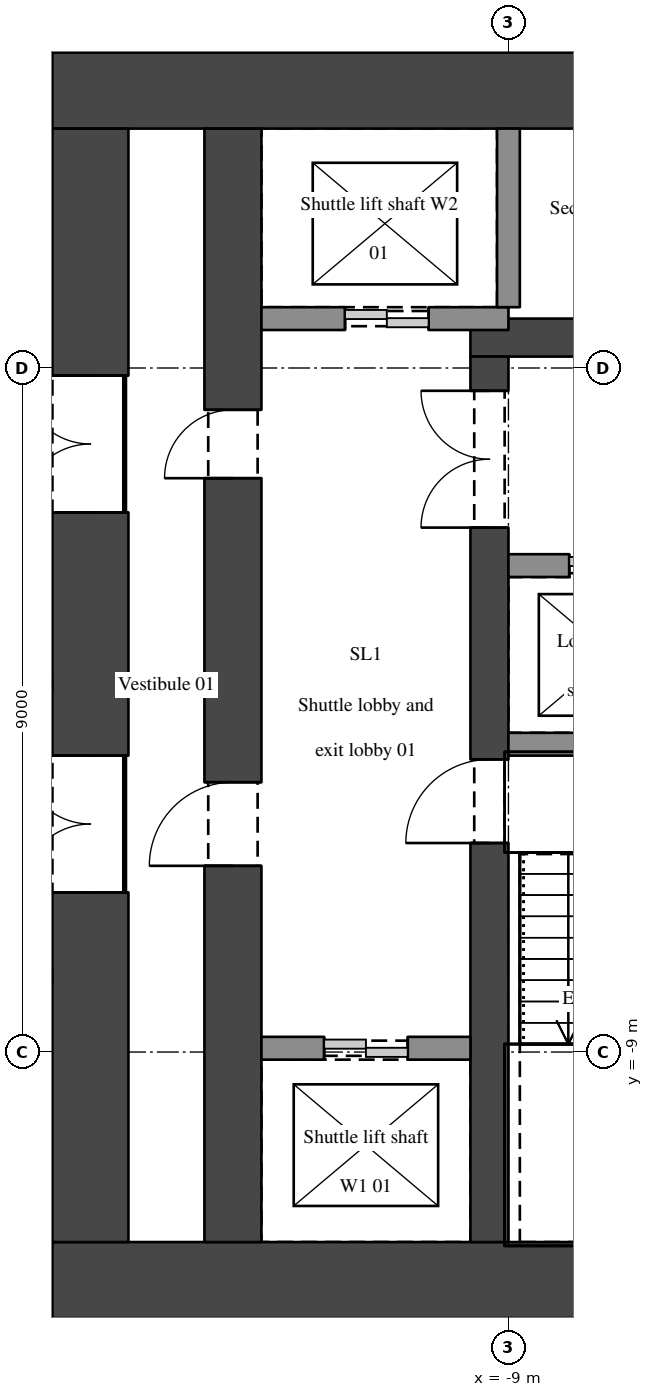
"""IFC4 building model, lengths in metres.
Left out: names, types, materials, properties, quantities, classifications, styles, units other than length and angle.
Written with IfcOpenShell. Run it as: python <this file> out.ifc"""

import sys

from ifc_helpers import new_model, si_unit, direction, frame, frame_2d, origin, place, context, subcontext, project, spatial, rectangle, extrude, element, fill, save


model = new_model("IFC4")
c1 = context("Model", 3, precision=1e-05, world=origin(), true_north=direction((0.0, 1.0)))
c2 = subcontext(c1, "Body", "Model", "MODEL_VIEW")
j1 = project(units=[si_unit("LENGTHUNIT", "METRE"), si_unit("PLANEANGLEUNIT", "RADIAN")], contexts=[c1])
p1 = place(None, origin())
s1 = spatial("IfcSite", under=j1, at=p1, CompositionType="ELEMENT")
p2 = place(p1, origin())
s2 = spatial("IfcBuilding", under=s1, at=p2, CompositionType="ELEMENT")
p3 = place(p2, origin())
s3 = spatial("IfcBuildingStorey", under=s2, at=p3, CompositionType="ELEMENT", Elevation=0.0)
for number, where, z_axis, x_axis in (
    (1, (-15.0, -12.0, 0.0), (0.0, 0.0, 1.0), (1.0, 0.0, 0.0)),
    (2, (-15.0, 3.65, 0.0), (0.0, 0.0, 1.0), (1.0, 0.0, 0.0)),
):
    element("IfcWall", number, at=place(p3, frame(where, z_axis=z_axis, x_axis=x_axis)), inside=s3, PredefinedType="SHEAR", context=c2, shape_type="SweptSolid", body=[
        extrude(rectangle(XDim=30.0, YDim=1.0, at=frame_2d((15.0, 0.0))), origin(), (0.0, 0.0, 1.0), 10.8),
    ])
p4 = place(p3, frame((-14.5, -11.5, 0.0), z_axis=(0.0, 0.0, 1.0), x_axis=(0.0, 1.0, 0.0)))
e3 = element("IfcWall", 3, at=p4, inside=s3, PredefinedType="SHEAR", context=c2, shape_type="SweptSolid", body=[
    extrude(rectangle(XDim=14.65, YDim=1.0, at=frame_2d((7.325, 0.0))), origin(), (0.0, 0.0, 1.0), 10.8),
])
p5 = place(p4, frame((9.6, 0.0, 0.0)))
e4 = element("IfcOpeningElement", 4, at=p5, cuts=e3, PredefinedType="OPENING", context=c2, shape_type="SweptSolid", body=[
    extrude(rectangle(XDim=1.8, YDim=2.1, at=frame_2d((0.9, 1.05))), frame((0.0, 0.51, 0.0), z_axis=(0.0, -1.0, 0.0), x_axis=(1.0, 0.0, 0.0)), (0.0, 0.0, 1.0), 1.02),
])
p6 = place(p4, frame((4.6, 0.0, 0.0)))
e5 = element("IfcOpeningElement", 5, at=p6, cuts=e3, PredefinedType="OPENING", context=c2, shape_type="SweptSolid", body=[
    extrude(rectangle(XDim=1.8, YDim=2.1, at=frame_2d((0.9, 1.05))), frame((0.0, 0.51, 0.0), z_axis=(0.0, -1.0, 0.0), x_axis=(1.0, 0.0, 0.0)), (0.0, 0.0, 1.0), 1.02),
])
p7 = place(p3, frame((-12.625, -11.5, 0.0), z_axis=(0.0, 0.0, 1.0), x_axis=(0.0, 1.0, 0.0)))
e6 = element("IfcWall", 6, at=p7, inside=s3, PredefinedType="SHEAR", context=c2, shape_type="SweptSolid", body=[
    extrude(rectangle(XDim=14.65, YDim=0.75, at=frame_2d((7.325, 0.0))), origin(), (0.0, 0.0, 1.0), 10.8),
])
p8 = place(p7, frame((4.95, 0.0, 0.0)))
e7 = element("IfcOpeningElement", 7, at=p8, cuts=e6, PredefinedType="OPENING", context=c2, shape_type="SweptSolid", body=[
    extrude(rectangle(XDim=1.1, YDim=2.1, at=frame_2d((0.55, 1.05))), frame((0.0, 0.385, 0.0), z_axis=(0.0, -1.0, 0.0), x_axis=(1.0, 0.0, 0.0)), (0.0, 0.0, 1.0), 0.77),
])
p9 = place(p7, frame((10.05, 0.0, 0.0)))
e8 = element("IfcOpeningElement", 8, at=p9, cuts=e6, PredefinedType="OPENING", context=c2, shape_type="SweptSolid", body=[
    extrude(rectangle(XDim=0.9, YDim=2.1, at=frame_2d((0.45, 1.05))), frame((0.0, 0.385, 0.0), z_axis=(0.0, -1.0, 0.0), x_axis=(1.0, 0.0, 0.0)), (0.0, 0.0, 1.0), 0.77),
])
p10 = place(p3, frame((-9.5, 0.4, 0.0), z_axis=(0.0, 0.0, 1.0), x_axis=(1.0, 0.0, 0.0)))
e9 = element("IfcWall", 9, at=p10, inside=s3, PredefinedType="SHEAR", context=c2, shape_type="SweptSolid", body=[
    extrude(rectangle(XDim=19.0, YDim=0.5, at=frame_2d((9.5, 0.0))), origin(), (0.0, 0.0, 1.0), 10.8),
])
p11 = place(p10, frame((1.4, 0.0, 0.0)))
e10 = element("IfcOpeningElement", 10, at=p11, cuts=e9, PredefinedType="OPENING", context=c2, shape_type="SweptSolid", body=[
    extrude(rectangle(XDim=0.9, YDim=2.1, at=frame_2d((0.45, 1.05))), frame((0.0, 0.26, 0.0), z_axis=(0.0, -1.0, 0.0), x_axis=(1.0, 0.0, 0.0)), (0.0, 0.0, 1.0), 0.52),
])
p12 = place(p10, frame((4.1, 0.0, 0.0)))
e11 = element("IfcOpeningElement", 11, at=p12, cuts=e9, PredefinedType="OPENING", context=c2, shape_type="SweptSolid", body=[
    extrude(rectangle(XDim=0.9, YDim=2.1, at=frame_2d((0.45, 1.05))), frame((0.0, 0.26, 0.0), z_axis=(0.0, -1.0, 0.0), x_axis=(1.0, 0.0, 0.0)), (0.0, 0.0, 1.0), 0.52),
])
p13 = place(p10, frame((6.8, 0.0, 0.0)))
e12 = element("IfcOpeningElement", 12, at=p13, cuts=e9, PredefinedType="OPENING", context=c2, shape_type="SweptSolid", body=[
    extrude(rectangle(XDim=0.9, YDim=2.1, at=frame_2d((0.45, 1.05))), frame((0.0, 0.26, 0.0), z_axis=(0.0, -1.0, 0.0), x_axis=(1.0, 0.0, 0.0)), (0.0, 0.0, 1.0), 0.52),
])
p14 = place(p10, frame((11.3, 0.0, 0.0)))
e13 = element("IfcOpeningElement", 13, at=p14, cuts=e9, PredefinedType="OPENING", context=c2, shape_type="SweptSolid", body=[
    extrude(rectangle(XDim=0.9, YDim=2.1, at=frame_2d((0.45, 1.05))), frame((0.0, 0.26, 0.0), z_axis=(0.0, -1.0, 0.0), x_axis=(1.0, 0.0, 0.0)), (0.0, 0.0, 1.0), 0.52),
])
p15 = place(p10, frame((14.0, 0.0, 0.0)))
e14 = element("IfcOpeningElement", 14, at=p15, cuts=e9, PredefinedType="OPENING", context=c2, shape_type="SweptSolid", body=[
    extrude(rectangle(XDim=0.9, YDim=2.1, at=frame_2d((0.45, 1.05))), frame((0.0, 0.26, 0.0), z_axis=(0.0, -1.0, 0.0), x_axis=(1.0, 0.0, 0.0)), (0.0, 0.0, 1.0), 0.52),
])
p16 = place(p10, frame((16.7, 0.0, 0.0)))
e15 = element("IfcOpeningElement", 15, at=p16, cuts=e9, PredefinedType="OPENING", context=c2, shape_type="SweptSolid", body=[
    extrude(rectangle(XDim=0.9, YDim=2.1, at=frame_2d((0.45, 1.05))), frame((0.0, 0.26, 0.0), z_axis=(0.0, -1.0, 0.0), x_axis=(1.0, 0.0, 0.0)), (0.0, 0.0, 1.0), 0.52),
])
p17 = place(p10, frame((9.05, 0.0, 0.0)))
e16 = element("IfcOpeningElement", 16, at=p17, cuts=e9, PredefinedType="OPENING", context=c2, shape_type="SweptSolid", body=[
    extrude(rectangle(XDim=0.9, YDim=2.1, at=frame_2d((0.45, 1.05))), frame((0.0, 0.26, 0.0), z_axis=(0.0, -1.0, 0.0), x_axis=(1.0, 0.0, 0.0)), (0.0, 0.0, 1.0), 0.52),
])
p18 = place(p3, frame((-9.25, -11.5, 0.0), z_axis=(0.0, 0.0, 1.0), x_axis=(0.0, 1.0, 0.0)))
e17 = element("IfcWall", 17, at=p18, inside=s3, PredefinedType="SHEAR", context=c2, shape_type="SweptSolid", body=[
    extrude(rectangle(XDim=11.65, YDim=0.5, at=frame_2d((5.825, 0.0))), origin(), (0.0, 0.0, 1.0), 10.8),
])
p19 = place(p18, frame((9.4, 0.0, 0.0)))
e18 = element("IfcOpeningElement", 18, at=p19, cuts=e17, PredefinedType="OPENING", context=c2, shape_type="SweptSolid", body=[
    extrude(rectangle(XDim=1.8, YDim=2.1, at=frame_2d((0.9, 1.05))), frame((0.0, 0.26, 0.0), z_axis=(0.0, -1.0, 0.0), x_axis=(1.0, 0.0, 0.0)), (0.0, 0.0, 1.0), 0.52),
])
p20 = place(p18, frame((5.25, 0.0, 0.0)))
e19 = element("IfcOpeningElement", 19, at=p20, cuts=e17, PredefinedType="OPENING", context=c2, shape_type="SweptSolid", body=[
    extrude(rectangle(XDim=1.1, YDim=2.1, at=frame_2d((0.55, 1.05))), frame((0.0, 0.26, 0.0), z_axis=(0.0, -1.0, 0.0), x_axis=(1.0, 0.0, 0.0)), (0.0, 0.0, 1.0), 0.52),
])
p21 = place(p3, frame((-12.25, -8.95, 0.0), z_axis=(0.0, 0.0, 1.0), x_axis=(1.0, 0.0, 0.0)))
e20 = element("IfcWall", 20, at=p21, inside=s3, PredefinedType="SHEAR", context=c2, shape_type="SweptSolid", body=[
    extrude(rectangle(XDim=2.75, YDim=0.3, at=frame_2d((1.375, 0.0))), origin(), (0.0, 0.0, 1.0), 10.8),
])
p22 = place(p21, frame((0.825, 0.0, 0.0)))
e21 = element("IfcOpeningElement", 21, at=p22, cuts=e20, PredefinedType="OPENING", context=c2, shape_type="SweptSolid", body=[
    extrude(rectangle(XDim=1.1, YDim=2.1, at=frame_2d((0.55, 1.05))), frame((0.0, 0.16, 0.0), z_axis=(0.0, -1.0, 0.0), x_axis=(1.0, 0.0, 0.0)), (0.0, 0.0, 1.0), 0.32),
])
p23 = place(p3, frame((-9.0, -4.95, 0.0), z_axis=(0.0, 0.0, 1.0), x_axis=(1.0, 0.0, 0.0)))
e22 = element("IfcWall", 22, at=p23, inside=s3, PredefinedType="SHEAR", context=c2, shape_type="SweptSolid", body=[
    extrude(rectangle(XDim=8.1, YDim=0.3, at=frame_2d((4.05, 0.0))), origin(), (0.0, 0.0, 1.0), 10.8),
])
p24 = place(p3, frame((-9.0, -2.6, 0.0), z_axis=(0.0, 0.0, 1.0), x_axis=(1.0, 0.0, 0.0)))
e23 = element("IfcWall", 23, at=p24, inside=s3, PredefinedType="SHEAR", context=c2, shape_type="SweptSolid", body=[
    extrude(rectangle(XDim=8.1, YDim=0.3, at=frame_2d((4.05, 0.0))), origin(), (0.0, 0.0, 1.0), 10.8),
])
p25 = place(p24, frame((0.8, 0.0, 0.0)))
e24 = element("IfcOpeningElement", 24, at=p25, cuts=e23, PredefinedType="OPENING", context=c2, shape_type="SweptSolid", body=[
    extrude(rectangle(XDim=1.1, YDim=2.1, at=frame_2d((0.55, 1.05))), frame((0.0, 0.16, 0.0), z_axis=(0.0, -1.0, 0.0), x_axis=(1.0, 0.0, 0.0)), (0.0, 0.0, 1.0), 0.32),
])
p26 = place(p24, frame((3.5, 0.0, 0.0)))
e25 = element("IfcOpeningElement", 25, at=p26, cuts=e23, PredefinedType="OPENING", context=c2, shape_type="SweptSolid", body=[
    extrude(rectangle(XDim=1.1, YDim=2.1, at=frame_2d((0.55, 1.05))), frame((0.0, 0.16, 0.0), z_axis=(0.0, -1.0, 0.0), x_axis=(1.0, 0.0, 0.0)), (0.0, 0.0, 1.0), 0.32),
])
p27 = place(p24, frame((6.2, 0.0, 0.0)))
e26 = element("IfcOpeningElement", 26, at=p27, cuts=e23, PredefinedType="OPENING", context=c2, shape_type="SweptSolid", body=[
    extrude(rectangle(XDim=1.1, YDim=2.1, at=frame_2d((0.55, 1.05))), frame((0.0, 0.16, 0.0), z_axis=(0.0, -1.0, 0.0), x_axis=(1.0, 0.0, 0.0)), (0.0, 0.0, 1.0), 0.32),
])
p28 = place(p3, frame((-9.0, 0.65, 0.0), z_axis=(0.0, 0.0, 1.0), x_axis=(-1.0, 0.0, 0.0)))
e27 = element("IfcWall", 27, at=p28, inside=s3, PredefinedType="SHEAR", context=c2, shape_type="SweptSolid", body=[
    extrude(rectangle(XDim=3.25, YDim=0.3, at=frame_2d((1.625, 0.0))), origin(), (0.0, 0.0, 1.0), 10.8),
])
p29 = place(p28, frame((1.05, 0.0, 0.0)))
e28 = element("IfcOpeningElement", 28, at=p29, cuts=e27, PredefinedType="OPENING", context=c2, shape_type="SweptSolid", body=[
    extrude(rectangle(XDim=1.1, YDim=2.1, at=frame_2d((0.55, 1.05))), frame((0.0, 0.16, 0.0), z_axis=(0.0, -1.0, 0.0), x_axis=(1.0, 0.0, 0.0)), (0.0, 0.0, 1.0), 0.32),
])
p30 = place(p3, frame((-9.0, 0.8, 0.0), z_axis=(0.0, 0.0, 1.0), x_axis=(0.0, 1.0, 0.0)))
e29 = element("IfcWall", 29, at=p30, inside=s3, PredefinedType="SHEAR", context=c2, shape_type="SweptSolid", body=[
    extrude(rectangle(XDim=2.35, YDim=0.3, at=frame_2d((1.175, 0.0))), origin(), (0.0, 0.0, 1.0), 10.8),
])
p31 = place(p5, origin())
e30 = element("IfcDoor", 30, at=p31, inside=s3, OperationType="DOUBLE_DOOR_SINGLE_SWING", PredefinedType="DOOR", context=c2, shape_type="SweptSolid", body=[
    extrude(rectangle(XDim=1.8, YDim=2.1, at=frame_2d((0.9, 1.05))), frame((0.0, 0.025, 0.0), z_axis=(0.0, -1.0, 0.0), x_axis=(1.0, 0.0, 0.0)), (0.0, 0.0, 1.0), 0.05),
])
fill(e4, e30)
p32 = place(p19, origin())
e31 = element("IfcDoor", 31, at=p32, inside=s3, OperationType="DOUBLE_DOOR_SINGLE_SWING", PredefinedType="DOOR", context=c2, shape_type="SweptSolid", body=[
    extrude(rectangle(XDim=1.8, YDim=2.1, at=frame_2d((0.9, 1.05))), frame((0.0, 0.025, 0.0), z_axis=(0.0, -1.0, 0.0), x_axis=(1.0, 0.0, 0.0)), (0.0, 0.0, 1.0), 0.05),
])
fill(e18, e31)
p33 = place(p20, origin())
e32 = element("IfcDoor", 32, at=p33, inside=s3, OperationType="SINGLE_SWING_LEFT", PredefinedType="DOOR", context=c2, shape_type="SweptSolid", body=[
    extrude(rectangle(XDim=1.1, YDim=2.1, at=frame_2d((0.55, 1.05))), frame((0.0, 0.025, 0.0), z_axis=(0.0, -1.0, 0.0), x_axis=(1.0, 0.0, 0.0)), (0.0, 0.0, 1.0), 0.05),
])
fill(e19, e32)
p34 = place(p8, origin())
e33 = element("IfcDoor", 33, at=p34, inside=s3, OperationType="SINGLE_SWING_LEFT", PredefinedType="DOOR", context=c2, shape_type="SweptSolid", body=[
    extrude(rectangle(XDim=1.1, YDim=2.1, at=frame_2d((0.55, 1.05))), frame((0.0, 0.025, 0.0), z_axis=(0.0, -1.0, 0.0), x_axis=(1.0, 0.0, 0.0)), (0.0, 0.0, 1.0), 0.05),
])
fill(e7, e33)
p35 = place(p6, origin())
e34 = element("IfcDoor", 34, at=p35, inside=s3, OperationType="DOUBLE_DOOR_SINGLE_SWING", PredefinedType="DOOR", context=c2, shape_type="SweptSolid", body=[
    extrude(rectangle(XDim=1.8, YDim=2.1, at=frame_2d((0.9, 1.05))), frame((0.0, 0.025, 0.0), z_axis=(0.0, -1.0, 0.0), x_axis=(1.0, 0.0, 0.0)), (0.0, 0.0, 1.0), 0.05),
])
fill(e5, e34)
p36 = place(p9, origin())
e35 = element("IfcDoor", 35, at=p36, inside=s3, OperationType="SINGLE_SWING_LEFT", PredefinedType="DOOR", context=c2, shape_type="SweptSolid", body=[
    extrude(rectangle(XDim=0.9, YDim=2.1, at=frame_2d((0.45, 1.05))), frame((0.0, 0.025, 0.0), z_axis=(0.0, -1.0, 0.0), x_axis=(1.0, 0.0, 0.0)), (0.0, 0.0, 1.0), 0.05),
])
fill(e8, e35)
p37 = place(p25, origin())
e36 = element("IfcDoor", 36, at=p37, inside=s3, OperationType="DOUBLE_DOOR_SLIDING", PredefinedType="DOOR", context=c2, shape_type="SweptSolid", body=[
    extrude(rectangle(XDim=1.1, YDim=2.1, at=frame_2d((0.55, 1.05))), frame((0.0, 0.025, 0.0), z_axis=(0.0, -1.0, 0.0), x_axis=(1.0, 0.0, 0.0)), (0.0, 0.0, 1.0), 0.05),
])
fill(e24, e36)
p38 = place(p29, origin())
e37 = element("IfcDoor", 37, at=p38, inside=s3, OperationType="DOUBLE_DOOR_SLIDING", PredefinedType="DOOR", context=c2, shape_type="SweptSolid", body=[
    extrude(rectangle(XDim=1.1, YDim=2.1, at=frame_2d((0.55, 1.05))), frame((0.0, 0.025, 0.0), z_axis=(0.0, -1.0, 0.0), x_axis=(1.0, 0.0, 0.0)), (0.0, 0.0, 1.0), 0.05),
])
fill(e28, e37)
p39 = place(p22, origin())
e38 = element("IfcDoor", 38, at=p39, inside=s3, OperationType="DOUBLE_DOOR_SLIDING", PredefinedType="DOOR", context=c2, shape_type="SweptSolid", body=[
    extrude(rectangle(XDim=1.1, YDim=2.1, at=frame_2d((0.55, 1.05))), frame((0.0, 0.025, 0.0), z_axis=(0.0, -1.0, 0.0), x_axis=(1.0, 0.0, 0.0)), (0.0, 0.0, 1.0), 0.05),
])
fill(e21, e38)
save(model, sys.argv[1])
